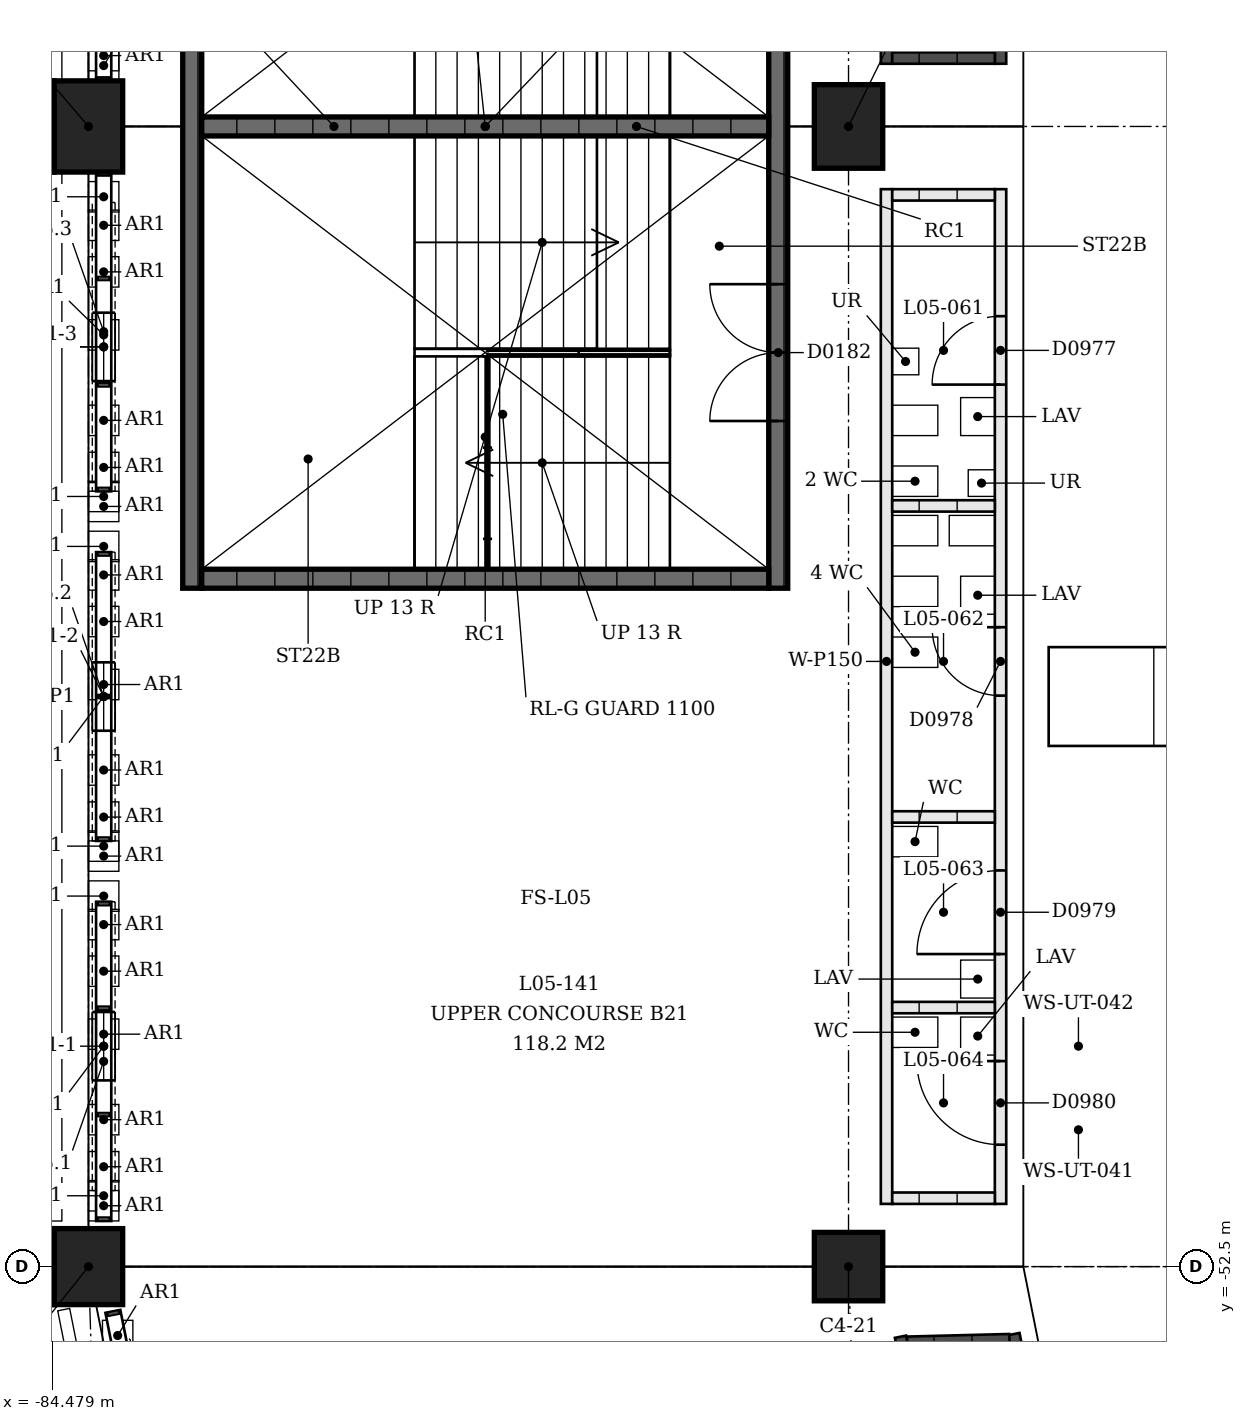
"""IFC4 building model, lengths in metres.
Left out: names, types, materials, properties, quantities, classifications, styles, units other than length and angle.
Written with IfcOpenShell. Run it as: python <this file> out.ifc"""

import sys

from ifc_helpers import new_model, si_unit, direction, frame, frame_2d, origin, origin_2d, place, context, subcontext, project, spatial, polyline, rectangle, outline, extrude, element, fill, save


model = new_model("IFC4")
c1 = context("Model", 3, precision=1e-05, world=origin(), true_north=direction((0.0, 1.0)))
c2 = subcontext(c1, "Body", "Model", "MODEL_VIEW")
j1 = project(units=[si_unit("LENGTHUNIT", "METRE"), si_unit("PLANEANGLEUNIT", "RADIAN")], contexts=[c1])
p1 = place(None, origin())
s1 = spatial("IfcSite", under=j1, at=p1, CompositionType="ELEMENT")
p2 = place(p1, origin())
s2 = spatial("IfcBuilding", under=s1, at=p2, CompositionType="ELEMENT")
p3 = place(p2, frame((0.0, 0.0, 22.5)))
s3 = spatial("IfcBuildingStorey", under=s2, at=p3, CompositionType="ELEMENT", Elevation=22.5)
p4 = place(p3, frame((-74.0, -52.5, 0.0), z_axis=(0.0, 0.0, 1.0), x_axis=(0.0, -1.0, 0.0)))
e1 = element("IfcColumn", 1, at=p4, inside=s3, PredefinedType="COLUMN", context=c2, shape_type="SweptSolid", body=[
    extrude(rectangle(XDim=0.9, YDim=0.9, at=origin_2d()), origin(), (0.0, 0.0, 1.0), 6.5),
])
p5 = place(p3, frame((-84.0, -52.5, 0.0), z_axis=(0.0, 0.0, 1.0), x_axis=(0.0, -1.0, 0.0)))
e2 = element("IfcColumn", 2, at=p5, inside=s3, PredefinedType="COLUMN", context=c2, shape_type="SweptSolid", body=[
    extrude(rectangle(XDim=1.0, YDim=0.9, at=origin_2d()), origin(), (0.0, 0.0, 1.0), 6.5),
])
p6 = place(p3, frame((-74.0, -37.5, 0.0), z_axis=(0.0, 0.0, 1.0), x_axis=(0.0, -1.0, 0.0)))
e3 = element("IfcColumn", 3, at=p6, inside=s3, PredefinedType="COLUMN", context=c2, shape_type="SweptSolid", body=[
    extrude(rectangle(XDim=1.1, YDim=0.9, at=origin_2d()), origin(), (0.0, 0.0, 1.0), 6.5),
])
p7 = place(p3, frame((-84.0, -37.5, 0.0), z_axis=(0.0, 0.0, 1.0), x_axis=(0.0, -1.0, 0.0)))
e4 = element("IfcColumn", 4, at=p7, inside=s3, PredefinedType="COLUMN", context=c2, shape_type="SweptSolid", body=[
    extrude(rectangle(XDim=1.2, YDim=0.9, at=origin_2d()), origin(), (0.0, 0.0, 1.0), 6.5),
])
p8 = place(p3, frame((-82.868, -57.166, 4.1), z_axis=(0.0, 0.0, 1.0), x_axis=(-0.195078797665, 0.980787572669, 0.0)))
e5 = element("IfcWall", 5, at=p8, inside=s3, PredefinedType="SOLIDWALL", context=c2, shape_type="SweptSolid", body=[
    extrude(outline(polyline([(0.0, 0.0), (3.757, 0.0), (3.757, 0.05), (3.635, 1.311), (3.271, 2.577), (2.678, 3.754), (1.879, 4.8), (1.079, 3.754), (0.486, 2.577), (0.123, 1.311), (0.0, 0.05), (0.0, 0.0)])), frame((0.0, 0.15, 0.0), z_axis=(0.0, -1.0, 0.0), x_axis=(1.0, 0.0, 0.0)), (0.0, 0.0, 1.0), 0.3),
])
p9 = place(p8, frame((1.428, 0.0, 0.4)))
e6 = element("IfcOpeningElement", 6, at=p9, cuts=e5, PredefinedType="OPENING", context=c2, shape_type="SweptSolid", body=[
    extrude(rectangle(XDim=0.9, YDim=3.6, at=frame_2d((0.45, 1.8))), frame((0.0, 0.16, 0.0), z_axis=(0.0, -1.0, 0.0), x_axis=(1.0, 0.0, 0.0)), (0.0, 0.0, 1.0), 0.32),
])
p10 = place(p3, frame((-83.8, -51.5, 4.1), z_axis=(0.0, 0.0, 1.0), x_axis=(0.0, 1.0, 0.0)))
e7 = element("IfcWall", 7, at=p10, inside=s3, PredefinedType="SOLIDWALL", context=c2, shape_type="SweptSolid", body=[
    extrude(outline(polyline([(0.0, 0.0), (3.8, 0.0), (3.8, 0.05), (3.676, 1.314), (3.308, 2.581), (2.709, 3.757), (1.9, 4.8), (1.091, 3.757), (0.492, 2.581), (0.124, 1.314), (0.0, 0.05), (0.0, 0.0)])), frame((0.0, 0.15, 0.0), z_axis=(0.0, -1.0, 0.0), x_axis=(1.0, 0.0, 0.0)), (0.0, 0.0, 1.0), 0.3),
])
p11 = place(p10, frame((1.45, 0.0, 0.4)))
e8 = element("IfcOpeningElement", 8, at=p11, cuts=e7, PredefinedType="OPENING", context=c2, shape_type="SweptSolid", body=[
    extrude(rectangle(XDim=0.9, YDim=3.6, at=frame_2d((0.45, 1.8))), frame((0.0, 0.16, 0.0), z_axis=(0.0, -1.0, 0.0), x_axis=(1.0, 0.0, 0.0)), (0.0, 0.0, 1.0), 0.32),
])
p12 = place(p3, frame((-83.8, -46.9, 4.1), z_axis=(0.0, 0.0, 1.0), x_axis=(0.0, 1.0, 0.0)))
e9 = element("IfcWall", 9, at=p12, inside=s3, PredefinedType="SOLIDWALL", context=c2, shape_type="SweptSolid", body=[
    extrude(outline(polyline([(0.0, 0.0), (3.8, 0.0), (3.8, 0.05), (3.676, 1.314), (3.308, 2.581), (2.709, 3.757), (1.9, 4.8), (1.091, 3.757), (0.492, 2.581), (0.124, 1.314), (0.0, 0.05), (0.0, 0.0)])), frame((0.0, 0.15, 0.0), z_axis=(0.0, -1.0, 0.0), x_axis=(1.0, 0.0, 0.0)), (0.0, 0.0, 1.0), 0.3),
])
p13 = place(p12, frame((1.45, 0.0, 0.4)))
e10 = element("IfcOpeningElement", 10, at=p13, cuts=e9, PredefinedType="OPENING", context=c2, shape_type="SweptSolid", body=[
    extrude(rectangle(XDim=0.9, YDim=3.6, at=frame_2d((0.45, 1.8))), frame((0.0, 0.16, 0.0), z_axis=(0.0, -1.0, 0.0), x_axis=(1.0, 0.0, 0.0)), (0.0, 0.0, 1.0), 0.32),
])
p14 = place(p3, frame((-83.8, -42.3, 4.1), z_axis=(0.0, 0.0, 1.0), x_axis=(0.0, 1.0, 0.0)))
e11 = element("IfcWall", 11, at=p14, inside=s3, PredefinedType="SOLIDWALL", context=c2, shape_type="SweptSolid", body=[
    extrude(outline(polyline([(0.0, 0.0), (3.8, 0.0), (3.8, 0.05), (3.676, 1.314), (3.308, 2.581), (2.709, 3.757), (1.9, 4.8), (1.091, 3.757), (0.492, 2.581), (0.124, 1.314), (0.0, 0.05), (0.0, 0.0)])), frame((0.0, 0.15, 0.0), z_axis=(0.0, -1.0, 0.0), x_axis=(1.0, 0.0, 0.0)), (0.0, 0.0, 1.0), 0.3),
])
p15 = place(p14, frame((1.45, 0.0, 0.4)))
e12 = element("IfcOpeningElement", 12, at=p15, cuts=e11, PredefinedType="OPENING", context=c2, shape_type="SweptSolid", body=[
    extrude(rectangle(XDim=0.9, YDim=3.6, at=frame_2d((0.45, 1.8))), frame((0.0, 0.16, 0.0), z_axis=(0.0, -1.0, 0.0), x_axis=(1.0, 0.0, 0.0)), (0.0, 0.0, 1.0), 0.32),
])
p16 = place(p3, frame((-74.925, -31.425, 0.0), z_axis=(0.0, 0.0, 1.0), x_axis=(0.0, -1.0, 0.0)))
e13 = element("IfcWall", 13, at=p16, inside=s3, PredefinedType="SHEAR", context=c2, shape_type="SweptSolid", body=[
    extrude(rectangle(XDim=12.15, YDim=0.25, at=frame_2d((6.075, 0.0))), origin(), (0.0, 0.0, 1.0), 2.1),
])
p17 = place(p16, frame((2.2, 0.0, 0.0)))
e14 = element("IfcOpeningElement", 14, at=p17, cuts=e13, PredefinedType="OPENING", context=c2, shape_type="SweptSolid", body=[
    extrude(rectangle(XDim=1.8, YDim=2.1, at=frame_2d((0.9, 1.05))), frame((0.0, 0.125, 0.0), z_axis=(0.0, -1.0, 0.0), x_axis=(1.0, 0.0, 0.0)), (0.0, 0.0, 1.0), 0.25),
])
p18 = place(p16, frame((8.15, 0.0, 0.0)))
e15 = element("IfcOpeningElement", 15, at=p18, cuts=e13, PredefinedType="OPENING", context=c2, shape_type="SweptSolid", body=[
    extrude(rectangle(XDim=1.8, YDim=2.1, at=frame_2d((0.9, 1.05))), frame((0.0, 0.125, 0.0), z_axis=(0.0, -1.0, 0.0), x_axis=(1.0, 0.0, 0.0)), (0.0, 0.0, 1.0), 0.25),
])
p19 = place(p3, frame((-82.635, -31.425, 0.0), z_axis=(0.0, 0.0, 1.0), x_axis=(0.0, -1.0, 0.0)))
e16 = element("IfcWall", 16, at=p19, inside=s3, PredefinedType="SHEAR", context=c2, shape_type="SweptSolid", body=[
    extrude(rectangle(XDim=12.15, YDim=0.25, at=frame_2d((6.075, 0.0))), origin(), (0.0, 0.0, 1.0), 2.1),
])
for number, where, z_axis, x_axis in (
    (17, (-75.05, -43.45, 0.0), (0.0, 0.0, 1.0), (-1.0, 0.0, 0.0)),
    (18, (-75.05, -37.5, 0.0), (0.0, 0.0, 1.0), (-1.0, 0.0, 0.0)),
):
    element("IfcWall", number, at=place(p3, frame(where, z_axis=z_axis, x_axis=x_axis)), inside=s3, PredefinedType="SHEAR", context=c2, shape_type="SweptSolid", body=[
        extrude(rectangle(XDim=7.46, YDim=0.25, at=frame_2d((3.73, 0.0))), origin(), (0.0, 0.0, 1.0), 2.1),
    ])
p20 = place(p3, frame((-69.265, -66.249, 0.0), z_axis=(0.0, 0.0, 1.0), x_axis=(-0.195095631841, 0.980784224198, 0.0)))
e19 = element("IfcWall", 19, at=p20, inside=s3, PredefinedType="SOLIDWALL", context=c2, shape_type="SweptSolid", body=[
    extrude(rectangle(XDim=13.113, YDim=0.15, at=frame_2d((6.557, 0.0))), origin(), (0.0, 0.0, 1.0), 3.0),
])
p21 = place(p20, frame((2.815, 0.0, 0.0)))
e20 = element("IfcOpeningElement", 20, at=p21, cuts=e19, PredefinedType="OPENING", context=c2, shape_type="SweptSolid", body=[
    extrude(rectangle(XDim=1.0, YDim=2.1, at=frame_2d((0.5, 1.05))), frame((0.0, 0.075, 0.0), z_axis=(0.0, -1.0, 0.0), x_axis=(1.0, 0.0, 0.0)), (0.0, 0.0, 1.0), 0.15),
])
p22 = place(p20, frame((9.298, 0.0, 0.0)))
e21 = element("IfcOpeningElement", 21, at=p22, cuts=e19, PredefinedType="OPENING", context=c2, shape_type="SweptSolid", body=[
    extrude(rectangle(XDim=1.0, YDim=2.1, at=frame_2d((0.5, 1.05))), frame((0.0, 0.075, 0.0), z_axis=(0.0, -1.0, 0.0), x_axis=(1.0, 0.0, 0.0)), (0.0, 0.0, 1.0), 0.15),
])
p23 = place(p3, frame((-70.657, -66.791, 0.0), z_axis=(0.0, 0.0, 1.0), x_axis=(-0.195103376128, 0.980782683689, 0.0)))
e22 = element("IfcWall", 22, at=p23, inside=s3, PredefinedType="SOLIDWALL", context=c2, shape_type="SweptSolid", body=[
    extrude(rectangle(XDim=13.631, YDim=0.15, at=frame_2d((6.815, 0.0))), origin(), (0.0, 0.0, 1.0), 3.0),
])
p24 = place(p3, frame((-71.884, -53.461, 0.0), z_axis=(0.0, 0.0, 1.0), x_axis=(-0.999681029438, -0.025255482205, 0.0)))
e23 = element("IfcWall", 23, at=p24, inside=s3, PredefinedType="SOLIDWALL", context=c2, shape_type="SweptSolid", body=[
    extrude(rectangle(XDim=1.344, YDim=0.15, at=frame_2d((0.672, 0.0))), origin(), (0.0, 0.0, 1.0), 3.0),
])
p25 = place(p3, frame((-72.0, -38.325, 0.0), z_axis=(0.0, 0.0, 1.0), x_axis=(0.0, -1.0, 0.0)))
e24 = element("IfcWall", 24, at=p25, inside=s3, PredefinedType="PARTITIONING", context=c2, shape_type="SweptSolid", body=[
    extrude(rectangle(XDim=13.35, YDim=0.15, at=frame_2d((6.675, 0.0))), origin(), (0.0, 0.0, 1.0), 3.0),
])
p26 = place(p25, frame((1.671, 0.0, 0.0)))
e25 = element("IfcOpeningElement", 25, at=p26, cuts=e24, PredefinedType="OPENING", context=c2, shape_type="SweptSolid", body=[
    extrude(rectangle(XDim=0.9, YDim=2.1, at=frame_2d((0.45, 1.05))), frame((0.0, 0.075, 0.0), z_axis=(0.0, -1.0, 0.0), x_axis=(1.0, 0.0, 0.0)), (0.0, 0.0, 1.0), 0.15),
])
p27 = place(p25, frame((5.763, 0.0, 0.0)))
e26 = element("IfcOpeningElement", 26, at=p27, cuts=e24, PredefinedType="OPENING", context=c2, shape_type="SweptSolid", body=[
    extrude(rectangle(XDim=0.9, YDim=2.1, at=frame_2d((0.45, 1.05))), frame((0.0, 0.075, 0.0), z_axis=(0.0, -1.0, 0.0), x_axis=(1.0, 0.0, 0.0)), (0.0, 0.0, 1.0), 0.15),
])
p28 = place(p25, frame((8.963, 0.0, 0.0)))
e27 = element("IfcOpeningElement", 27, at=p28, cuts=e24, PredefinedType="OPENING", context=c2, shape_type="SweptSolid", body=[
    extrude(rectangle(XDim=1.1, YDim=2.1, at=frame_2d((0.55, 1.05))), frame((0.0, 0.075, 0.0), z_axis=(0.0, -1.0, 0.0), x_axis=(1.0, 0.0, 0.0)), (0.0, 0.0, 1.0), 0.15),
])
p29 = place(p25, frame((11.471, 0.0, 0.0)))
e28 = element("IfcOpeningElement", 28, at=p29, cuts=e24, PredefinedType="OPENING", context=c2, shape_type="SweptSolid", body=[
    extrude(rectangle(XDim=1.1, YDim=2.1, at=frame_2d((0.55, 1.05))), frame((0.0, 0.075, 0.0), z_axis=(0.0, -1.0, 0.0), x_axis=(1.0, 0.0, 0.0)), (0.0, 0.0, 1.0), 0.15),
])
p30 = place(p3, frame((-73.5, -38.325, 0.0), z_axis=(0.0, 0.0, 1.0), x_axis=(0.0, -1.0, 0.0)))
e29 = element("IfcWall", 29, at=p30, inside=s3, PredefinedType="PARTITIONING", context=c2, shape_type="SweptSolid", body=[
    extrude(rectangle(XDim=13.35, YDim=0.15, at=frame_2d((6.675, 0.0))), origin(), (0.0, 0.0, 1.0), 3.0),
])
for number, where, z_axis, x_axis in (
    (30, (-72.075, -38.4, 0.0), (0.0, 0.0, 1.0), (-1.0, 0.0, 0.0)),
    (31, (-72.075, -42.492, 0.0), (0.0, 0.0, 1.0), (-1.0, 0.0, 0.0)),
    (32, (-72.075, -46.584, 0.0), (0.0, 0.0, 1.0), (-1.0, 0.0, 0.0)),
    (33, (-72.075, -49.092, 0.0), (0.0, 0.0, 1.0), (-1.0, 0.0, 0.0)),
    (34, (-72.075, -51.6, 0.0), (0.0, 0.0, 1.0), (-1.0, 0.0, 0.0)),
):
    element("IfcWall", number, at=place(p3, frame(where, z_axis=z_axis, x_axis=x_axis)), inside=s3, PredefinedType="PARTITIONING", context=c2, shape_type="SweptSolid", body=[
        extrude(rectangle(XDim=1.35, YDim=0.15, at=frame_2d((0.675, 0.0))), origin(), (0.0, 0.0, 1.0), 3.0),
    ])
p31 = place(p3, frame((-72.0, -36.675, 0.0), z_axis=(0.0, 0.0, 1.0), x_axis=(0.0, 1.0, 0.0)))
e35 = element("IfcWall", 35, at=p31, inside=s3, PredefinedType="SOLIDWALL", context=c2, shape_type="SweptSolid", body=[
    extrude(rectangle(XDim=13.35, YDim=0.15, at=frame_2d((6.675, 0.0))), origin(), (0.0, 0.0, 1.0), 3.0),
])
p32 = place(p31, frame((2.875, 0.0, 0.0)))
e36 = element("IfcOpeningElement", 36, at=p32, cuts=e35, PredefinedType="OPENING", context=c2, shape_type="SweptSolid", body=[
    extrude(rectangle(XDim=1.0, YDim=2.1, at=frame_2d((0.5, 1.05))), frame((0.0, 0.075, 0.0), z_axis=(0.0, -1.0, 0.0), x_axis=(1.0, 0.0, 0.0)), (0.0, 0.0, 1.0), 0.15),
])
p33 = place(p31, frame((9.475, 0.0, 0.0)))
e37 = element("IfcOpeningElement", 37, at=p33, cuts=e35, PredefinedType="OPENING", context=c2, shape_type="SweptSolid", body=[
    extrude(rectangle(XDim=1.0, YDim=2.1, at=frame_2d((0.5, 1.05))), frame((0.0, 0.075, 0.0), z_axis=(0.0, -1.0, 0.0), x_axis=(1.0, 0.0, 0.0)), (0.0, 0.0, 1.0), 0.15),
])
p34 = place(p3, frame((-73.5, -36.675, 0.0), z_axis=(0.0, 0.0, 1.0), x_axis=(0.0, 1.0, 0.0)))
e38 = element("IfcWall", 38, at=p34, inside=s3, PredefinedType="SOLIDWALL", context=c2, shape_type="SweptSolid", body=[
    extrude(rectangle(XDim=13.35, YDim=0.15, at=frame_2d((6.675, 0.0))), origin(), (0.0, 0.0, 1.0), 3.0),
])
p35 = place(p3, frame((-72.075, -36.6, 0.0), z_axis=(0.0, 0.0, 1.0), x_axis=(-1.0, 0.0, 0.0)))
e39 = element("IfcWall", 39, at=p35, inside=s3, PredefinedType="SOLIDWALL", context=c2, shape_type="SweptSolid", body=[
    extrude(rectangle(XDim=1.35, YDim=0.15, at=frame_2d((0.675, 0.0))), origin(), (0.0, 0.0, 1.0), 3.0),
])
p36 = place(p11, origin())
e40 = element("IfcWindow", 40, at=p36, inside=s3, PartitioningType="SINGLE_PANEL", PredefinedType="WINDOW", context=c2, shape_type="SweptSolid", body=[
    extrude(rectangle(XDim=0.9, YDim=3.6, at=frame_2d((0.45, 1.8))), frame((0.0, 0.03, 0.0), z_axis=(0.0, -1.0, 0.0), x_axis=(1.0, 0.0, 0.0)), (0.0, 0.0, 1.0), 0.06),
])
fill(e8, e40)
p37 = place(p13, origin())
e41 = element("IfcWindow", 41, at=p37, inside=s3, PartitioningType="SINGLE_PANEL", PredefinedType="WINDOW", context=c2, shape_type="SweptSolid", body=[
    extrude(rectangle(XDim=0.9, YDim=3.6, at=frame_2d((0.45, 1.8))), frame((0.0, 0.03, 0.0), z_axis=(0.0, -1.0, 0.0), x_axis=(1.0, 0.0, 0.0)), (0.0, 0.0, 1.0), 0.06),
])
fill(e10, e41)
p38 = place(p15, origin())
e42 = element("IfcWindow", 42, at=p38, inside=s3, PartitioningType="SINGLE_PANEL", PredefinedType="WINDOW", context=c2, shape_type="SweptSolid", body=[
    extrude(rectangle(XDim=0.9, YDim=3.6, at=frame_2d((0.45, 1.8))), frame((0.0, 0.03, 0.0), z_axis=(0.0, -1.0, 0.0), x_axis=(1.0, 0.0, 0.0)), (0.0, 0.0, 1.0), 0.06),
])
fill(e12, e42)
p39 = place(p18, origin())
e43 = element("IfcDoor", 43, at=p39, inside=s3, OperationType="DOUBLE_DOOR_SINGLE_SWING", PredefinedType="DOOR", context=c2, shape_type="SweptSolid", body=[
    extrude(rectangle(XDim=1.8, YDim=2.1, at=frame_2d((0.9, 1.05))), frame((0.0, 0.025, 0.0), z_axis=(0.0, -1.0, 0.0), x_axis=(1.0, 0.0, 0.0)), (0.0, 0.0, 1.0), 0.05),
])
fill(e15, e43)
p40 = place(p26, origin())
e44 = element("IfcDoor", 44, at=p40, inside=s3, OperationType="SINGLE_SWING_RIGHT", PredefinedType="DOOR", context=c2, shape_type="SweptSolid", body=[
    extrude(rectangle(XDim=0.9, YDim=2.1, at=frame_2d((0.45, 1.05))), frame((0.0, 0.025, 0.0), z_axis=(0.0, -1.0, 0.0), x_axis=(1.0, 0.0, 0.0)), (0.0, 0.0, 1.0), 0.05),
])
fill(e25, e44)
p41 = place(p27, origin())
e45 = element("IfcDoor", 45, at=p41, inside=s3, OperationType="SINGLE_SWING_LEFT", PredefinedType="DOOR", context=c2, shape_type="SweptSolid", body=[
    extrude(rectangle(XDim=0.9, YDim=2.1, at=frame_2d((0.45, 1.05))), frame((0.0, 0.025, 0.0), z_axis=(0.0, -1.0, 0.0), x_axis=(1.0, 0.0, 0.0)), (0.0, 0.0, 1.0), 0.05),
])
fill(e26, e45)
p42 = place(p28, origin())
e46 = element("IfcDoor", 46, at=p42, inside=s3, OperationType="SINGLE_SWING_RIGHT", PredefinedType="DOOR", context=c2, shape_type="SweptSolid", body=[
    extrude(rectangle(XDim=1.1, YDim=2.1, at=frame_2d((0.55, 1.05))), frame((0.0, 0.025, 0.0), z_axis=(0.0, -1.0, 0.0), x_axis=(1.0, 0.0, 0.0)), (0.0, 0.0, 1.0), 0.05),
])
fill(e27, e46)
p43 = place(p29, origin())
e47 = element("IfcDoor", 47, at=p43, inside=s3, OperationType="SINGLE_SWING_LEFT", PredefinedType="DOOR", context=c2, shape_type="SweptSolid", body=[
    extrude(rectangle(XDim=1.1, YDim=2.1, at=frame_2d((0.55, 1.05))), frame((0.0, 0.025, 0.0), z_axis=(0.0, -1.0, 0.0), x_axis=(1.0, 0.0, 0.0)), (0.0, 0.0, 1.0), 0.05),
])
fill(e28, e47)
save(model, sys.argv[1])
